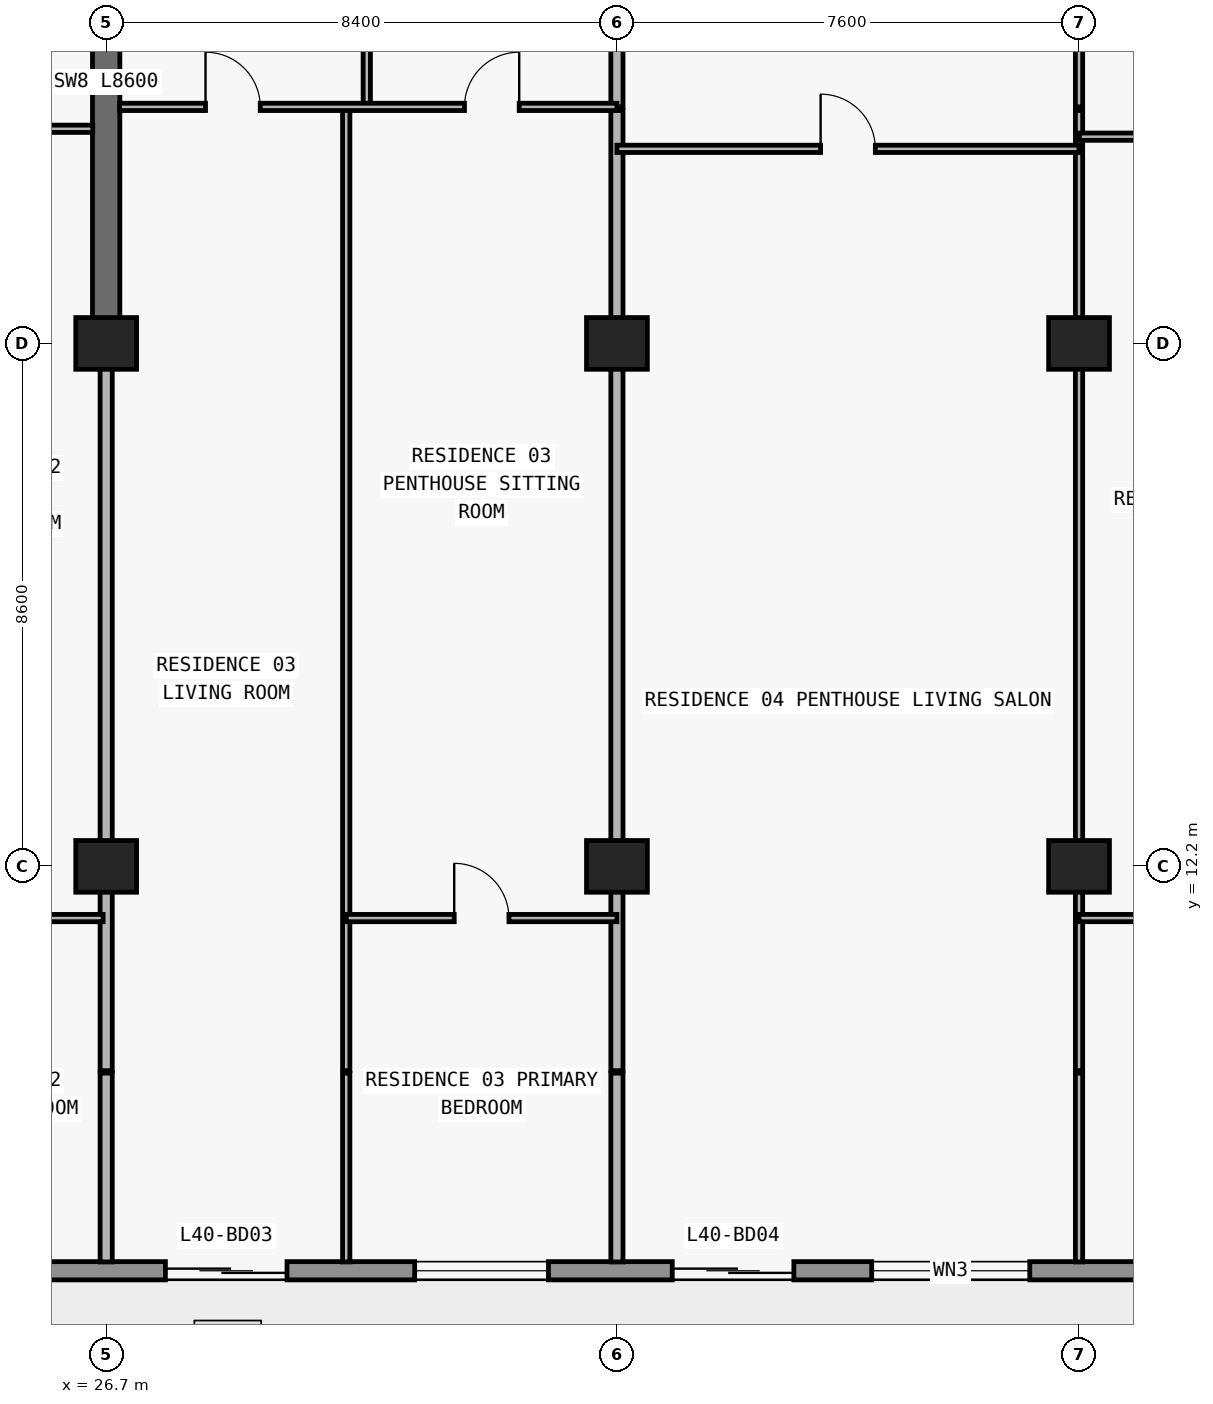
"""IFC4 building model, lengths in metres.
Left out: names, types, materials, properties, quantities, classifications, styles, units other than length and angle.
Written with IfcOpenShell. Run it as: python <this file> out.ifc"""

import sys

from ifc_helpers import new_model, si_unit, direction, frame, frame_2d, origin, origin_2d, place, context, subcontext, project, spatial, rectangle, extrude, element, fill, save


model = new_model("IFC4")
c1 = context("Model", 3, precision=1e-05, world=origin(), true_north=direction((0.0, 1.0)))
c2 = subcontext(c1, "Body", "Model", "MODEL_VIEW")
j1 = project(units=[si_unit("LENGTHUNIT", "METRE"), si_unit("PLANEANGLEUNIT", "RADIAN")], contexts=[c1])
p1 = place(None, origin())
s1 = spatial("IfcSite", under=j1, at=p1, CompositionType="ELEMENT")
p2 = place(p1, origin())
s2 = spatial("IfcBuilding", under=s1, at=p2, CompositionType="ELEMENT")
p3 = place(p2, frame((0.0, 0.0, 145.5)))
s3 = spatial("IfcBuildingStorey", under=s2, at=p3, CompositionType="ELEMENT", Elevation=145.5)
for number, where, z_axis, x_axis in (
    (1, (26.7, 12.2, 0.0), (0.0, 0.0, 1.0), (1.0, 0.0, 0.0)),
    (2, (35.1, 12.2, 0.0), (0.0, 0.0, 1.0), (1.0, 0.0, 0.0)),
    (3, (42.7, 12.2, 0.0), (0.0, 0.0, 1.0), (1.0, 0.0, 0.0)),
    (4, (26.7, 20.8, 0.0), (0.0, 0.0, 1.0), (1.0, 0.0, 0.0)),
    (5, (35.1, 20.8, 0.0), (0.0, 0.0, 1.0), (1.0, 0.0, 0.0)),
    (6, (42.7, 20.8, 0.0), (0.0, 0.0, 1.0), (1.0, 0.0, 0.0)),
):
    element("IfcColumn", number, at=place(p3, frame(where, z_axis=z_axis, x_axis=x_axis)), inside=s3, PredefinedType="COLUMN", context=c2, shape_type="SweptSolid", body=[
        extrude(rectangle(XDim=1.0, YDim=0.85, at=origin_2d()), origin(), (0.0, 0.0, 1.0), 3.05),
    ])
p4 = place(p3, frame((26.7, 20.8, 0.0), z_axis=(0.0, 0.0, 1.0), x_axis=(0.0, 1.0, 0.0)))
e7 = element("IfcWall", 7, at=p4, inside=s3, PredefinedType="SHEAR", context=c2, shape_type="SweptSolid", body=[
    extrude(rectangle(XDim=8.6, YDim=0.45, at=frame_2d((4.3, 0.0))), origin(), (0.0, 0.0, 1.0), 3.05),
])
p5 = place(p3, frame((70.1, 5.55, 0.0), z_axis=(0.0, 0.0, 1.0), x_axis=(-1.0, 0.0, 0.0)))
e8 = element("IfcWall", 8, at=p5, inside=s3, PredefinedType="STANDARD", context=c2, shape_type="SweptSolid", body=[
    extrude(rectangle(XDim=62.4, YDim=0.3, at=frame_2d((31.2, 0.0))), origin(), (0.0, 0.0, 1.0), 3.05),
])
p6 = place(p5, frame((57.226, 0.0, 0.0)))
e9 = element("IfcOpeningElement", 9, at=p6, cuts=e8, PredefinedType="OPENING", context=c2, shape_type="SweptSolid", body=[
    extrude(rectangle(XDim=2.0, YDim=2.3, at=frame_2d((1.0, 1.15))), frame((0.0, 0.16, 0.0), z_axis=(0.0, -1.0, 0.0), x_axis=(1.0, 0.0, 0.0)), (0.0, 0.0, 1.0), 0.32),
])
p7 = place(p5, frame((52.926, 0.0, 0.85)))
e10 = element("IfcOpeningElement", 10, at=p7, cuts=e8, PredefinedType="OPENING", context=c2, shape_type="SweptSolid", body=[
    extrude(rectangle(XDim=2.2, YDim=1.55, at=frame_2d((1.1, 0.775))), frame((0.0, 0.16, 0.0), z_axis=(0.0, -1.0, 0.0), x_axis=(1.0, 0.0, 0.0)), (0.0, 0.0, 1.0), 0.32),
])
p8 = place(p5, frame((48.49, 0.0, 0.0)))
e11 = element("IfcOpeningElement", 11, at=p8, cuts=e8, PredefinedType="OPENING", context=c2, shape_type="SweptSolid", body=[
    extrude(rectangle(XDim=2.0, YDim=2.3, at=frame_2d((1.0, 1.15))), frame((0.0, 0.16, 0.0), z_axis=(0.0, -1.0, 0.0), x_axis=(1.0, 0.0, 0.0)), (0.0, 0.0, 1.0), 0.32),
])
p9 = place(p5, frame((44.39, 0.0, 0.85)))
e12 = element("IfcOpeningElement", 12, at=p9, cuts=e8, PredefinedType="OPENING", context=c2, shape_type="SweptSolid", body=[
    extrude(rectangle(XDim=1.8, YDim=1.55, at=frame_2d((0.9, 0.775))), frame((0.0, 0.16, 0.0), z_axis=(0.0, -1.0, 0.0), x_axis=(1.0, 0.0, 0.0)), (0.0, 0.0, 1.0), 0.32),
])
p10 = place(p5, frame((40.426, 0.0, 0.0)))
e13 = element("IfcOpeningElement", 13, at=p10, cuts=e8, PredefinedType="OPENING", context=c2, shape_type="SweptSolid", body=[
    extrude(rectangle(XDim=2.0, YDim=2.3, at=frame_2d((1.0, 1.15))), frame((0.0, 0.16, 0.0), z_axis=(0.0, -1.0, 0.0), x_axis=(1.0, 0.0, 0.0)), (0.0, 0.0, 1.0), 0.32),
])
p11 = place(p5, frame((36.126, 0.0, 0.85)))
e14 = element("IfcOpeningElement", 14, at=p11, cuts=e8, PredefinedType="OPENING", context=c2, shape_type="SweptSolid", body=[
    extrude(rectangle(XDim=2.2, YDim=1.55, at=frame_2d((1.1, 0.775))), frame((0.0, 0.16, 0.0), z_axis=(0.0, -1.0, 0.0), x_axis=(1.0, 0.0, 0.0)), (0.0, 0.0, 1.0), 0.32),
])
p12 = place(p5, frame((32.09, 0.0, 0.0)))
e15 = element("IfcOpeningElement", 15, at=p12, cuts=e8, PredefinedType="OPENING", context=c2, shape_type="SweptSolid", body=[
    extrude(rectangle(XDim=2.0, YDim=2.3, at=frame_2d((1.0, 1.15))), frame((0.0, 0.16, 0.0), z_axis=(0.0, -1.0, 0.0), x_axis=(1.0, 0.0, 0.0)), (0.0, 0.0, 1.0), 0.32),
])
p13 = place(p5, frame((28.21, 0.0, 0.65)))
e16 = element("IfcOpeningElement", 16, at=p13, cuts=e8, PredefinedType="OPENING", context=c2, shape_type="SweptSolid", body=[
    extrude(rectangle(XDim=2.6, YDim=1.85, at=frame_2d((1.3, 0.925))), frame((0.0, 0.16, 0.0), z_axis=(0.0, -1.0, 0.0), x_axis=(1.0, 0.0, 0.0)), (0.0, 0.0, 1.0), 0.32),
])
p14 = place(p5, frame((22.1, 0.0, 0.85)))
e17 = element("IfcOpeningElement", 17, at=p14, cuts=e8, PredefinedType="OPENING", context=c2, shape_type="SweptSolid", body=[
    extrude(rectangle(XDim=2.2, YDim=1.55, at=frame_2d((1.1, 0.775))), frame((0.0, 0.16, 0.0), z_axis=(0.0, -1.0, 0.0), x_axis=(1.0, 0.0, 0.0)), (0.0, 0.0, 1.0), 0.32),
])
p15 = place(p5, frame((16.09, 0.0, 0.0)))
e18 = element("IfcOpeningElement", 18, at=p15, cuts=e8, PredefinedType="OPENING", context=c2, shape_type="SweptSolid", body=[
    extrude(rectangle(XDim=2.0, YDim=2.3, at=frame_2d((1.0, 1.15))), frame((0.0, 0.16, 0.0), z_axis=(0.0, -1.0, 0.0), x_axis=(1.0, 0.0, 0.0)), (0.0, 0.0, 1.0), 0.32),
])
p16 = place(p5, frame((11.41, 0.0, 0.65)))
e19 = element("IfcOpeningElement", 19, at=p16, cuts=e8, PredefinedType="OPENING", context=c2, shape_type="SweptSolid", body=[
    extrude(rectangle(XDim=2.6, YDim=1.85, at=frame_2d((1.3, 0.925))), frame((0.0, 0.16, 0.0), z_axis=(0.0, -1.0, 0.0), x_axis=(1.0, 0.0, 0.0)), (0.0, 0.0, 1.0), 0.32),
])
p17 = place(p5, frame((5.3, 0.0, 0.85)))
e20 = element("IfcOpeningElement", 20, at=p17, cuts=e8, PredefinedType="OPENING", context=c2, shape_type="SweptSolid", body=[
    extrude(rectangle(XDim=2.2, YDim=1.55, at=frame_2d((1.1, 0.775))), frame((0.0, 0.16, 0.0), z_axis=(0.0, -1.0, 0.0), x_axis=(1.0, 0.0, 0.0)), (0.0, 0.0, 1.0), 0.32),
])
p18 = place(p3, frame((26.7, 5.695, 0.0), z_axis=(0.0, 0.0, 1.0), x_axis=(0.0, 1.0, 0.0)))
e21 = element("IfcWall", 21, at=p18, inside=s3, PredefinedType="PARTITIONING", context=c2, shape_type="SweptSolid", body=[
    extrude(rectangle(XDim=3.105, YDim=0.2, at=frame_2d((1.552, 0.0))), origin(), (0.0, 0.0, 1.0), 3.05),
])
p19 = place(p3, frame((26.7, 8.84, 0.0), z_axis=(0.0, 0.0, 1.0), x_axis=(0.0, 1.0, 0.0)))
e22 = element("IfcWall", 22, at=p19, inside=s3, PredefinedType="PARTITIONING", context=c2, shape_type="SweptSolid", body=[
    extrude(rectangle(XDim=11.955, YDim=0.2, at=frame_2d((5.978, 0.0))), origin(), (0.0, 0.0, 1.0), 2.174),
])
p20 = place(p3, frame((30.648, 5.695, 0.0), z_axis=(0.0, 0.0, 1.0), x_axis=(0.0, 1.0, 0.0)))
e23 = element("IfcWall", 23, at=p20, inside=s3, PredefinedType="PARTITIONING", context=c2, shape_type="SweptSolid", body=[
    extrude(rectangle(XDim=3.105, YDim=0.12, at=frame_2d((1.552, 0.0))), origin(), (0.0, 0.0, 1.0), 3.05),
])
p21 = place(p3, frame((30.648, 8.84, 0.0), z_axis=(0.0, 0.0, 1.0), x_axis=(0.0, 1.0, 0.0)))
e24 = element("IfcWall", 24, at=p21, inside=s3, PredefinedType="PARTITIONING", context=c2, shape_type="SweptSolid", body=[
    extrude(rectangle(XDim=15.79, YDim=0.12, at=frame_2d((7.895, 0.0))), origin(), (0.0, 0.0, 1.0), 3.05),
])
p22 = place(p3, frame((30.986, 24.69, 0.0), z_axis=(0.0, 0.0, 1.0), x_axis=(0.0, 1.0, 0.0)))
e25 = element("IfcWall", 25, at=p22, inside=s3, PredefinedType="PARTITIONING", context=c2, shape_type="SweptSolid", body=[
    extrude(rectangle(XDim=5.09, YDim=0.12, at=frame_2d((2.545, 0.0))), origin(), (0.0, 0.0, 1.0), 2.725),
])
p23 = place(p22, frame((2.095, 0.0, 0.0)))
e26 = element("IfcOpeningElement", 26, at=p23, cuts=e25, PredefinedType="OPENING", context=c2, shape_type="SweptSolid", body=[
    extrude(rectangle(XDim=0.9, YDim=2.15, at=frame_2d((0.45, 1.075))), frame((0.0, 0.07, 0.0), z_axis=(0.0, -1.0, 0.0), x_axis=(1.0, 0.0, 0.0)), (0.0, 0.0, 1.0), 0.14),
])
p24 = place(p3, frame((35.1, 5.695, 0.0), z_axis=(0.0, 0.0, 1.0), x_axis=(0.0, 1.0, 0.0)))
e27 = element("IfcWall", 27, at=p24, inside=s3, PredefinedType="PARTITIONING", context=c2, shape_type="SweptSolid", body=[
    extrude(rectangle(XDim=3.105, YDim=0.2, at=frame_2d((1.552, 0.0))), origin(), (0.0, 0.0, 1.0), 3.05),
])
p25 = place(p3, frame((35.1, 8.84, 0.0), z_axis=(0.0, 0.0, 1.0), x_axis=(0.0, 1.0, 0.0)))
e28 = element("IfcWall", 28, at=p25, inside=s3, PredefinedType="PARTITIONING", context=c2, shape_type="SweptSolid", body=[
    extrude(rectangle(XDim=15.79, YDim=0.2, at=frame_2d((7.895, 0.0))), origin(), (0.0, 0.0, 1.0), 2.174),
])
p26 = place(p3, frame((35.1, 24.69, 0.0), z_axis=(0.0, 0.0, 1.0), x_axis=(0.0, 1.0, 0.0)))
e29 = element("IfcWall", 29, at=p26, inside=s3, PredefinedType="PARTITIONING", context=c2, shape_type="SweptSolid", body=[
    extrude(rectangle(XDim=5.09, YDim=0.2, at=frame_2d((2.545, 0.0))), origin(), (0.0, 0.0, 1.0), 2.174),
])
p27 = place(p3, frame((42.7, 5.695, 0.0), z_axis=(0.0, 0.0, 1.0), x_axis=(0.0, 1.0, 0.0)))
e30 = element("IfcWall", 30, at=p27, inside=s3, PredefinedType="PARTITIONING", context=c2, shape_type="SweptSolid", body=[
    extrude(rectangle(XDim=3.105, YDim=0.12, at=frame_2d((1.552, 0.0))), origin(), (0.0, 0.0, 1.0), 3.05),
])
p28 = place(p3, frame((42.7, 8.84, 0.0), z_axis=(0.0, 0.0, 1.0), x_axis=(0.0, 1.0, 0.0)))
e31 = element("IfcWall", 31, at=p28, inside=s3, PredefinedType="PARTITIONING", context=c2, shape_type="SweptSolid", body=[
    extrude(rectangle(XDim=15.79, YDim=0.12, at=frame_2d((7.895, 0.0))), origin(), (0.0, 0.0, 1.0), 2.174),
])
p29 = place(p3, frame((42.7, 24.69, 0.0), z_axis=(0.0, 0.0, 1.0), x_axis=(0.0, 1.0, 0.0)))
e32 = element("IfcWall", 32, at=p29, inside=s3, PredefinedType="PARTITIONING", context=c2, shape_type="SweptSolid", body=[
    extrude(rectangle(XDim=5.09, YDim=0.12, at=frame_2d((2.545, 0.0))), origin(), (0.0, 0.0, 1.0), 2.174),
])
p30 = place(p29, frame((1.505, 0.0, 0.0)))
e33 = element("IfcOpeningElement", 33, at=p30, cuts=e32, PredefinedType="OPENING", context=c2, shape_type="SweptSolid", body=[
    extrude(rectangle(XDim=0.9, YDim=2.124, at=frame_2d((0.45, 1.062))), frame((0.0, 0.07, 0.0), z_axis=(0.0, -1.0, 0.0), x_axis=(1.0, 0.0, 0.0)), (0.0, 0.0, 1.0), 0.14),
])
p31 = place(p3, frame((22.92, 11.35, 0.0), z_axis=(0.0, 0.0, 1.0), x_axis=(1.0, 0.0, 0.0)))
e34 = element("IfcWall", 34, at=p31, inside=s3, PredefinedType="PARTITIONING", context=c2, shape_type="SweptSolid", body=[
    extrude(rectangle(XDim=3.73, YDim=0.12, at=frame_2d((1.865, 0.0))), origin(), (0.0, 0.0, 1.0), 3.05),
])
p32 = place(p31, frame((1.415, 0.0, 0.0)))
e35 = element("IfcOpeningElement", 35, at=p32, cuts=e34, PredefinedType="OPENING", context=c2, shape_type="SweptSolid", body=[
    extrude(rectangle(XDim=0.9, YDim=2.15, at=frame_2d((0.45, 1.075))), frame((0.0, 0.07, 0.0), z_axis=(0.0, -1.0, 0.0), x_axis=(1.0, 0.0, 0.0)), (0.0, 0.0, 1.0), 0.14),
])
p33 = place(p3, frame((30.648, 11.35, 0.0), z_axis=(0.0, 0.0, 1.0), x_axis=(1.0, 0.0, 0.0)))
e36 = element("IfcWall", 36, at=p33, inside=s3, PredefinedType="PARTITIONING", context=c2, shape_type="SweptSolid", body=[
    extrude(rectangle(XDim=4.452, YDim=0.12, at=frame_2d((2.226, 0.0))), origin(), (0.0, 0.0, 1.0), 3.05),
])
p34 = place(p33, frame((1.776, 0.0, 0.0)))
e37 = element("IfcOpeningElement", 37, at=p34, cuts=e36, PredefinedType="OPENING", context=c2, shape_type="SweptSolid", body=[
    extrude(rectangle(XDim=0.9, YDim=2.15, at=frame_2d((0.45, 1.075))), frame((0.0, 0.07, 0.0), z_axis=(0.0, -1.0, 0.0), x_axis=(1.0, 0.0, 0.0)), (0.0, 0.0, 1.0), 0.14),
])
p35 = place(p3, frame((42.7, 11.35, 0.0), z_axis=(0.0, 0.0, 1.0), x_axis=(1.0, 0.0, 0.0)))
e38 = element("IfcWall", 38, at=p35, inside=s3, PredefinedType="PARTITIONING", context=c2, shape_type="SweptSolid", body=[
    extrude(rectangle(XDim=8.4, YDim=0.12, at=frame_2d((4.2, 0.0))), origin(), (0.0, 0.0, 1.0), 3.05),
])
p36 = place(p35, frame((3.75, 0.0, 0.0)))
e39 = element("IfcOpeningElement", 39, at=p36, cuts=e38, PredefinedType="OPENING", context=c2, shape_type="SweptSolid", body=[
    extrude(rectangle(XDim=0.9, YDim=2.15, at=frame_2d((0.45, 1.075))), frame((0.0, 0.07, 0.0), z_axis=(0.0, -1.0, 0.0), x_axis=(1.0, 0.0, 0.0)), (0.0, 0.0, 1.0), 0.14),
])
p37 = place(p3, frame((35.1, 24.0, 0.0), z_axis=(0.0, 0.0, 1.0), x_axis=(1.0, 0.0, 0.0)))
e40 = element("IfcWall", 40, at=p37, inside=s3, PredefinedType="PARTITIONING", context=c2, shape_type="SweptSolid", body=[
    extrude(rectangle(XDim=7.6, YDim=0.12, at=frame_2d((3.8, 0.0))), origin(), (0.0, 0.0, 1.0), 3.05),
])
p38 = place(p37, frame((3.35, 0.0, 0.0)))
e41 = element("IfcOpeningElement", 41, at=p38, cuts=e40, PredefinedType="OPENING", context=c2, shape_type="SweptSolid", body=[
    extrude(rectangle(XDim=0.9, YDim=2.15, at=frame_2d((0.45, 1.075))), frame((0.0, 0.07, 0.0), z_axis=(0.0, -1.0, 0.0), x_axis=(1.0, 0.0, 0.0)), (0.0, 0.0, 1.0), 0.14),
])
p39 = place(p3, frame((42.705, 24.2, 0.0), z_axis=(0.0, 0.0, 1.0), x_axis=(1.0, 0.0, 0.0)))
e42 = element("IfcWall", 42, at=p39, inside=s3, PredefinedType="PARTITIONING", context=c2, shape_type="SweptSolid", body=[
    extrude(rectangle(XDim=8.175, YDim=0.12, at=frame_2d((4.087, 0.0))), origin(), (0.0, 0.0, 1.0), 3.05),
])
p40 = place(p39, frame((3.637, 0.0, 0.0)))
e43 = element("IfcOpeningElement", 43, at=p40, cuts=e42, PredefinedType="OPENING", context=c2, shape_type="SweptSolid", body=[
    extrude(rectangle(XDim=0.9, YDim=2.15, at=frame_2d((0.45, 1.075))), frame((0.0, 0.07, 0.0), z_axis=(0.0, -1.0, 0.0), x_axis=(1.0, 0.0, 0.0)), (0.0, 0.0, 1.0), 0.14),
])
p41 = place(p3, frame((18.3, 24.33, 0.0), z_axis=(0.0, 0.0, 1.0), x_axis=(1.0, 0.0, 0.0)))
e44 = element("IfcWall", 44, at=p41, inside=s3, PredefinedType="PARTITIONING", context=c2, shape_type="SweptSolid", body=[
    extrude(rectangle(XDim=8.18, YDim=0.12, at=frame_2d((4.09, 0.0))), origin(), (0.0, 0.0, 1.0), 3.05),
])
p42 = place(p41, frame((1.86, 0.0, 0.0)))
e45 = element("IfcOpeningElement", 45, at=p42, cuts=e44, PredefinedType="OPENING", context=c2, shape_type="SweptSolid", body=[
    extrude(rectangle(XDim=0.9, YDim=2.15, at=frame_2d((0.45, 1.075))), frame((0.0, 0.07, 0.0), z_axis=(0.0, -1.0, 0.0), x_axis=(1.0, 0.0, 0.0)), (0.0, 0.0, 1.0), 0.14),
])
p43 = place(p41, frame((6.033, 0.0, 0.0)))
e46 = element("IfcOpeningElement", 46, at=p43, cuts=e44, PredefinedType="OPENING", context=c2, shape_type="SweptSolid", body=[
    extrude(rectangle(XDim=0.9, YDim=2.15, at=frame_2d((0.45, 1.075))), frame((0.0, 0.07, 0.0), z_axis=(0.0, -1.0, 0.0), x_axis=(1.0, 0.0, 0.0)), (0.0, 0.0, 1.0), 0.14),
])
p44 = place(p3, frame((26.92, 24.69, 0.0), z_axis=(0.0, 0.0, 1.0), x_axis=(1.0, 0.0, 0.0)))
e47 = element("IfcWall", 47, at=p44, inside=s3, PredefinedType="PARTITIONING", context=c2, shape_type="SweptSolid", body=[
    extrude(rectangle(XDim=8.18, YDim=0.12, at=frame_2d((4.09, 0.0))), origin(), (0.0, 0.0, 1.0), 3.05),
])
p45 = place(p44, frame((1.414, 0.0, 0.0)))
e48 = element("IfcOpeningElement", 48, at=p45, cuts=e47, PredefinedType="OPENING", context=c2, shape_type="SweptSolid", body=[
    extrude(rectangle(XDim=0.9, YDim=2.15, at=frame_2d((0.45, 1.075))), frame((0.0, 0.07, 0.0), z_axis=(0.0, -1.0, 0.0), x_axis=(1.0, 0.0, 0.0)), (0.0, 0.0, 1.0), 0.14),
])
p46 = place(p44, frame((5.673, 0.0, 0.0)))
e49 = element("IfcOpeningElement", 49, at=p46, cuts=e47, PredefinedType="OPENING", context=c2, shape_type="SweptSolid", body=[
    extrude(rectangle(XDim=0.9, YDim=2.15, at=frame_2d((0.45, 1.075))), frame((0.0, 0.07, 0.0), z_axis=(0.0, -1.0, 0.0), x_axis=(1.0, 0.0, 0.0)), (0.0, 0.0, 1.0), 0.14),
])
p47 = place(p10, origin())
e50 = element("IfcDoor", 50, at=p47, inside=s3, OperationType="DOUBLE_DOOR_SLIDING", PredefinedType="DOOR", context=c2, shape_type="SweptSolid", body=[
    extrude(rectangle(XDim=2.0, YDim=2.3, at=frame_2d((1.0, 1.15))), frame((0.0, 0.025, 0.0), z_axis=(0.0, -1.0, 0.0), x_axis=(1.0, 0.0, 0.0)), (0.0, 0.0, 1.0), 0.05),
])
fill(e13, e50)
p48 = place(p11, origin())
e51 = element("IfcWindow", 51, at=p48, inside=s3, PartitioningType="SINGLE_PANEL", PredefinedType="WINDOW", context=c2, shape_type="SweptSolid", body=[
    extrude(rectangle(XDim=2.2, YDim=1.55, at=frame_2d((1.1, 0.775))), frame((0.0, 0.03, 0.0), z_axis=(0.0, -1.0, 0.0), x_axis=(1.0, 0.0, 0.0)), (0.0, 0.0, 1.0), 0.06),
])
fill(e14, e51)
p49 = place(p12, origin())
e52 = element("IfcDoor", 52, at=p49, inside=s3, OperationType="DOUBLE_DOOR_SLIDING", PredefinedType="DOOR", context=c2, shape_type="SweptSolid", body=[
    extrude(rectangle(XDim=2.0, YDim=2.3, at=frame_2d((1.0, 1.15))), frame((0.0, 0.025, 0.0), z_axis=(0.0, -1.0, 0.0), x_axis=(1.0, 0.0, 0.0)), (0.0, 0.0, 1.0), 0.05),
])
fill(e15, e52)
p50 = place(p13, origin())
e53 = element("IfcWindow", 53, at=p50, inside=s3, PartitioningType="SINGLE_PANEL", PredefinedType="WINDOW", context=c2, shape_type="SweptSolid", body=[
    extrude(rectangle(XDim=2.6, YDim=1.85, at=frame_2d((1.3, 0.925))), frame((0.0, 0.03, 0.0), z_axis=(0.0, -1.0, 0.0), x_axis=(1.0, 0.0, 0.0)), (0.0, 0.0, 1.0), 0.06),
])
fill(e16, e53)
p51 = place(p45, origin())
e54 = element("IfcDoor", 54, at=p51, inside=s3, OperationType="SINGLE_SWING_LEFT", PredefinedType="DOOR", context=c2, shape_type="SweptSolid", body=[
    extrude(rectangle(XDim=0.9, YDim=2.15, at=frame_2d((0.45, 1.075))), frame((0.0, 0.025, 0.0), z_axis=(0.0, -1.0, 0.0), x_axis=(1.0, 0.0, 0.0)), (0.0, 0.0, 1.0), 0.05),
])
fill(e48, e54)
p52 = place(p46, origin())
e55 = element("IfcDoor", 55, at=p52, inside=s3, OperationType="SINGLE_SWING_RIGHT", PredefinedType="DOOR", context=c2, shape_type="SweptSolid", body=[
    extrude(rectangle(XDim=0.9, YDim=2.15, at=frame_2d((0.45, 1.075))), frame((0.0, 0.025, 0.0), z_axis=(0.0, -1.0, 0.0), x_axis=(1.0, 0.0, 0.0)), (0.0, 0.0, 1.0), 0.05),
])
fill(e49, e55)
p53 = place(p34, origin())
e56 = element("IfcDoor", 56, at=p53, inside=s3, OperationType="SINGLE_SWING_LEFT", PredefinedType="DOOR", context=c2, shape_type="SweptSolid", body=[
    extrude(rectangle(XDim=0.9, YDim=2.15, at=frame_2d((0.45, 1.075))), frame((0.0, 0.025, 0.0), z_axis=(0.0, -1.0, 0.0), x_axis=(1.0, 0.0, 0.0)), (0.0, 0.0, 1.0), 0.05),
])
fill(e37, e56)
p54 = place(p38, origin())
e57 = element("IfcDoor", 57, at=p54, inside=s3, OperationType="SINGLE_SWING_LEFT", PredefinedType="DOOR", context=c2, shape_type="SweptSolid", body=[
    extrude(rectangle(XDim=0.9, YDim=2.15, at=frame_2d((0.45, 1.075))), frame((0.0, 0.025, 0.0), z_axis=(0.0, -1.0, 0.0), x_axis=(1.0, 0.0, 0.0)), (0.0, 0.0, 1.0), 0.05),
])
fill(e41, e57)
save(model, sys.argv[1])
